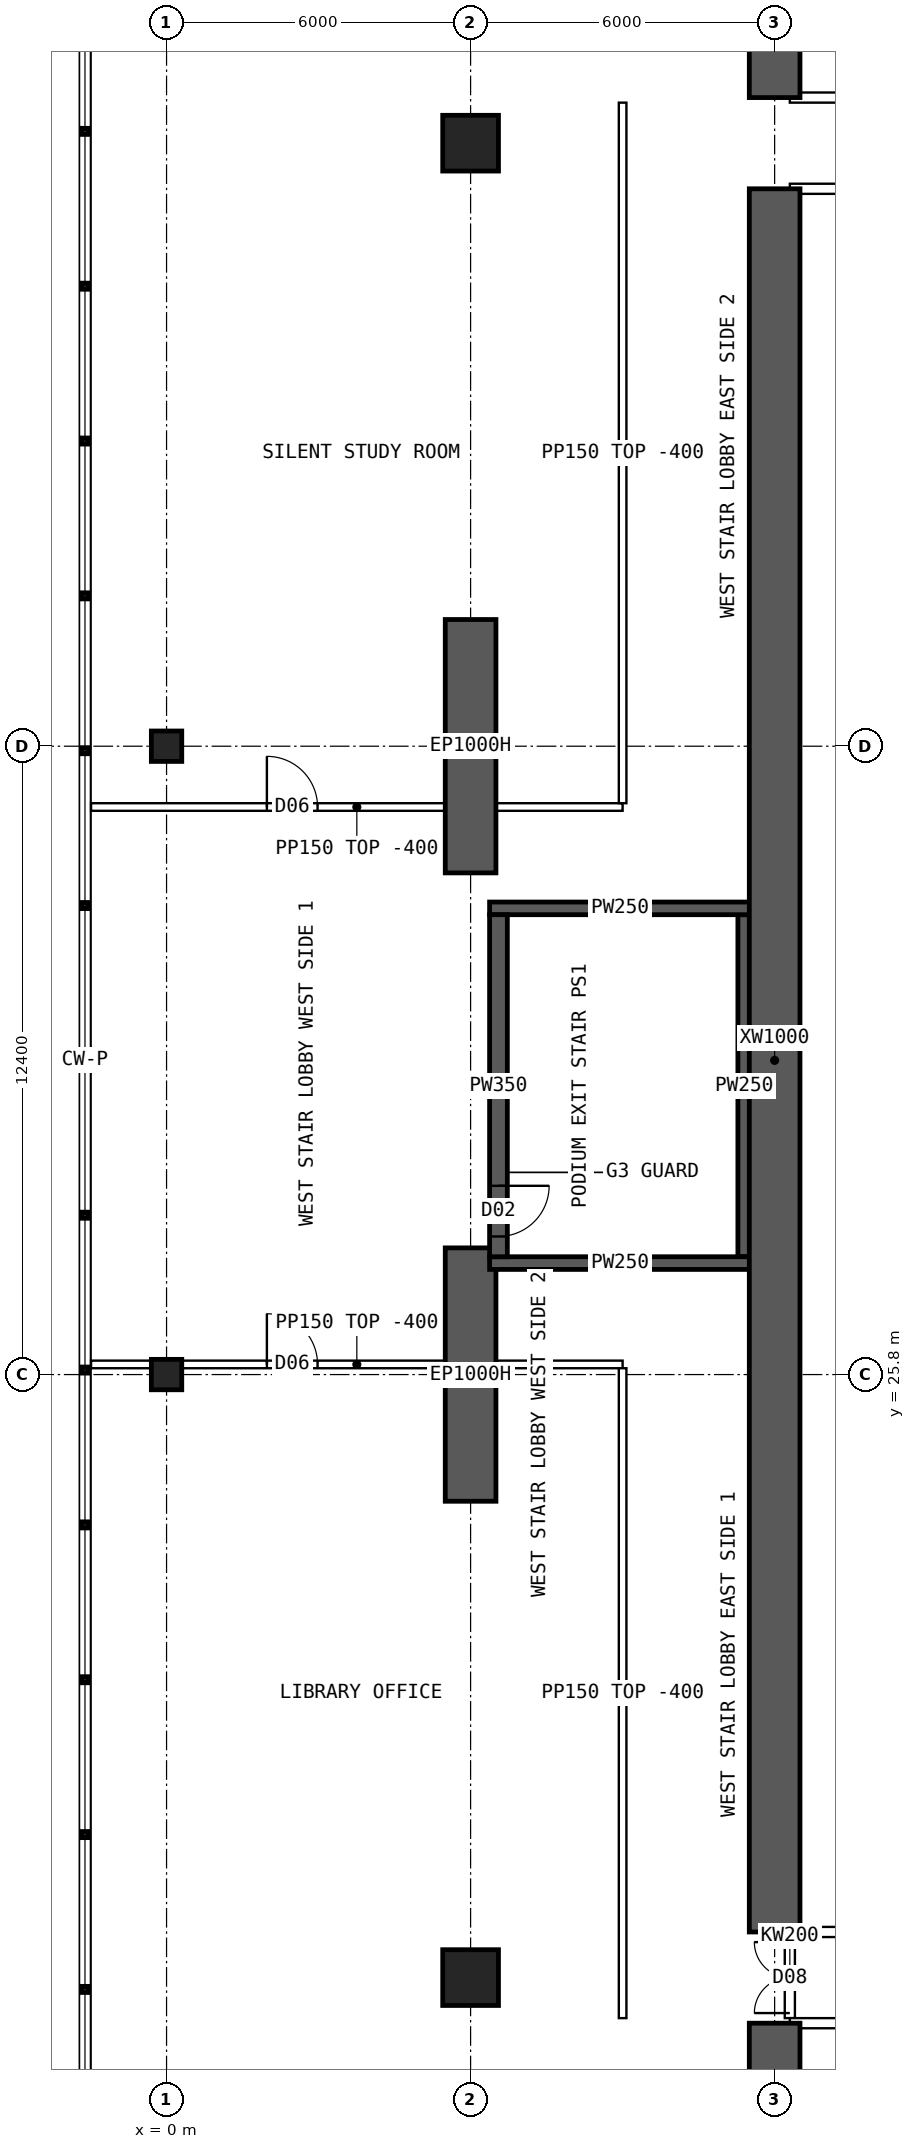
"""IFC4 building model, lengths in metres.
Left out: names, types, materials, properties, quantities, classifications, styles, units other than length and angle.
Written with IfcOpenShell. Run it as: python <this file> out.ifc"""

import sys

from ifc_helpers import new_model, si_unit, direction, frame, frame_2d, origin, origin_2d, place, context, subcontext, project, spatial, polyline, rectangle, hollow_rectangle, outline, extrude, element, fill, save


model = new_model("IFC4")
c1 = context("Model", 3, precision=1e-05, world=origin(), true_north=direction((0.0, 1.0)))
c2 = subcontext(c1, "Body", "Model", "MODEL_VIEW")
j1 = project(units=[si_unit("LENGTHUNIT", "METRE"), si_unit("PLANEANGLEUNIT", "RADIAN")], contexts=[c1])
p1 = place(None, origin())
s1 = spatial("IfcSite", under=j1, at=p1, CompositionType="ELEMENT")
p2 = place(p1, origin())
s2 = spatial("IfcBuilding", under=s1, at=p2, CompositionType="ELEMENT")
p3 = place(p2, frame((0.0, 0.0, 11.0)))
s3 = spatial("IfcBuildingStorey", under=s2, at=p3, CompositionType="ELEMENT", Elevation=11.0)
for number, where, z_axis, x_axis in (
    (1, (6.0, 23.3, 0.0), (0.0, 0.0, 1.0), (0.0, 1.0, 0.0)),
    (2, (6.0, 35.7, 0.0), (0.0, 0.0, 1.0), (0.0, 1.0, 0.0)),
):
    element("IfcWall", number, at=place(p3, frame(where, z_axis=z_axis, x_axis=x_axis)), inside=s3, PredefinedType="SHEAR", context=c2, shape_type="SweptSolid", body=[
        extrude(rectangle(XDim=5.0, YDim=1.0, at=frame_2d((2.5, 0.0))), origin(), (0.0, 0.0, 1.0), 5.0),
    ])
for number, where, z_axis, x_axis in (
    (3, (6.0, 13.9, 0.0), (0.0, 0.0, 1.0), (1.0, 0.0, 0.0)),
    (4, (6.0, 50.1, 0.0), (0.0, 0.0, 1.0), (1.0, 0.0, 0.0)),
):
    element("IfcColumn", number, at=place(p3, frame(where, z_axis=z_axis, x_axis=x_axis)), inside=s3, PredefinedType="COLUMN", context=c2, shape_type="SweptSolid", body=[
        extrude(hollow_rectangle(XDim=1.1, YDim=1.1, WallThickness=0.11, at=origin_2d()), origin(), (0.0, 0.0, 1.0), 5.0),
    ])
for number, where, z_axis, x_axis in (
    (5, (0.0, 25.8, 0.0), (0.0, 0.0, 1.0), (1.0, 0.0, 0.0)),
    (6, (0.0, 38.2, 0.0), (0.0, 0.0, 1.0), (1.0, 0.0, 0.0)),
):
    element("IfcColumn", number, at=place(p3, frame(where, z_axis=z_axis, x_axis=x_axis)), inside=s3, PredefinedType="COLUMN", context=c2, shape_type="SweptSolid", body=[
        extrude(hollow_rectangle(XDim=0.6, YDim=0.6, WallThickness=0.06, at=origin_2d()), origin(), (0.0, 0.0, 1.0), 5.0),
    ])
p4 = place(p3, frame((6.375, 28.0, 0.0), z_axis=(0.0, 0.0, 1.0), x_axis=(1.0, 0.0, 0.0)))
e7 = element("IfcWall", 7, at=p4, inside=s3, PredefinedType="SHEAR", context=c2, shape_type="SweptSolid", body=[
    extrude(rectangle(XDim=5.15, YDim=0.25, at=frame_2d((2.575, 0.0))), origin(), (0.0, 0.0, 1.0), 5.0),
])
p5 = place(p3, frame((11.4, 28.125, 0.0), z_axis=(0.0, 0.0, 1.0), x_axis=(0.0, 1.0, 0.0)))
e8 = element("IfcWall", 8, at=p5, inside=s3, PredefinedType="SHEAR", context=c2, shape_type="SweptSolid", body=[
    extrude(rectangle(XDim=6.75, YDim=0.25, at=frame_2d((3.375, 0.0))), origin(), (0.0, 0.0, 1.0), 5.0),
])
p6 = place(p3, frame((11.525, 35.0, 0.0), z_axis=(0.0, 0.0, 1.0), x_axis=(-1.0, 0.0, 0.0)))
e9 = element("IfcWall", 9, at=p6, inside=s3, PredefinedType="SHEAR", context=c2, shape_type="SweptSolid", body=[
    extrude(rectangle(XDim=5.15, YDim=0.25, at=frame_2d((2.575, 0.0))), origin(), (0.0, 0.0, 1.0), 5.0),
])
p7 = place(p3, frame((6.55, 34.875, 0.0), z_axis=(0.0, 0.0, 1.0), x_axis=(0.0, -1.0, 0.0)))
e10 = element("IfcWall", 10, at=p7, inside=s3, PredefinedType="SHEAR", context=c2, shape_type="SweptSolid", body=[
    extrude(rectangle(XDim=6.75, YDim=0.35, at=frame_2d((3.375, 0.0))), origin(), (0.0, 0.0, 1.0), 5.0),
])
p8 = place(p7, frame((5.35, 0.0, 0.0)))
e11 = element("IfcOpeningElement", 11, at=p8, cuts=e10, PredefinedType="OPENING", context=c2, shape_type="SweptSolid", body=[
    extrude(rectangle(XDim=1.0, YDim=2.1, at=frame_2d((0.5, 1.05))), frame((0.0, 0.185, 0.0), z_axis=(0.0, -1.0, 0.0), x_axis=(1.0, 0.0, 0.0)), (0.0, 0.0, 1.0), 0.37),
])
for number, where, z_axis, x_axis in (
    (12, (12.0, 7.7, 0.0), (0.0, 0.0, 1.0), (0.0, 1.0, 0.0)),
    (13, (12.0, 51.0, 0.0), (0.0, 0.0, 1.0), (0.0, 1.0, 0.0)),
):
    element("IfcWall", number, at=place(p3, frame(where, z_axis=z_axis, x_axis=x_axis)), inside=s3, PredefinedType="SHEAR", context=c2, shape_type="SweptSolid", body=[
        extrude(rectangle(XDim=5.3, YDim=1.0, at=frame_2d((2.65, 0.0))), origin(), (0.0, 0.0, 1.0), 5.0),
    ])
p9 = place(p3, frame((12.0, 14.8, 0.0), z_axis=(0.0, 0.0, 1.0), x_axis=(0.0, 1.0, 0.0)))
e14 = element("IfcWall", 14, at=p9, inside=s3, PredefinedType="SHEAR", context=c2, shape_type="SweptSolid", body=[
    extrude(rectangle(XDim=34.4, YDim=1.0, at=frame_2d((17.2, 0.0))), origin(), (0.0, 0.0, 1.0), 5.0),
])
for number, where, z_axis, x_axis in (
    (15, (12.3, 13.0, 0.0), (0.0, 0.0, 1.0), (1.0, 0.0, 0.0)),
    (16, (12.3, 51.0, 0.0), (0.0, 0.0, 1.0), (1.0, 0.0, 0.0)),
):
    element("IfcWall", number, at=place(p3, frame(where, z_axis=z_axis, x_axis=x_axis)), inside=s3, PredefinedType="SOLIDWALL", context=c2, shape_type="SweptSolid", body=[
        extrude(rectangle(XDim=5.2, YDim=0.2, at=frame_2d((2.6, 0.0))), origin(), (0.0, 0.0, 1.0), 4.6),
    ])
for number, where, z_axis, x_axis in (
    (17, (12.3, 14.8, 0.0), (0.0, 0.0, 1.0), (1.0, 0.0, 0.0)),
    (18, (12.3, 49.2, 0.0), (0.0, 0.0, 1.0), (1.0, 0.0, 0.0)),
):
    element("IfcWall", number, at=place(p3, frame(where, z_axis=z_axis, x_axis=x_axis)), inside=s3, PredefinedType="SOLIDWALL", context=c2, shape_type="SweptSolid", body=[
        extrude(rectangle(XDim=3.3, YDim=0.2, at=frame_2d((1.65, 0.0))), origin(), (0.0, 0.0, 1.0), 4.6),
    ])
p10 = place(p3, frame((-1.49, 26.0, 0.0), z_axis=(0.0, 0.0, 1.0), x_axis=(1.0, 0.0, 0.0)))
e19 = element("IfcWall", 19, at=p10, inside=s3, PredefinedType="PARTITIONING", context=c2, shape_type="SweptSolid", body=[
    extrude(outline(polyline([(0.0, 0.0), (10.49, 0.0), (10.49, 4.6), (1.792, 4.6), (1.79, 4.0), (1.192, 4.0), (1.19, 4.6), (0.0, 4.6), (0.0, 0.0)])), frame((0.0, 0.075, 0.0), z_axis=(0.0, -1.0, 0.0), x_axis=(1.0, 0.0, 0.0)), (0.0, 0.0, 1.0), 0.15),
])
p11 = place(p10, frame((3.47, 0.0, 0.0)))
e20 = element("IfcOpeningElement", 20, at=p11, cuts=e19, PredefinedType="OPENING", context=c2, shape_type="SweptSolid", body=[
    extrude(rectangle(XDim=1.0, YDim=2.1, at=frame_2d((0.5, 1.05))), frame((0.0, 0.085, 0.0), z_axis=(0.0, -1.0, 0.0), x_axis=(1.0, 0.0, 0.0)), (0.0, 0.0, 1.0), 0.17),
])
p12 = place(p3, frame((-1.49, 37.0, 0.0), z_axis=(0.0, 0.0, 1.0), x_axis=(1.0, 0.0, 0.0)))
e21 = element("IfcWall", 21, at=p12, inside=s3, PredefinedType="PARTITIONING", context=c2, shape_type="SweptSolid", body=[
    extrude(outline(polyline([(0.0, 0.0), (10.49, 0.0), (10.49, 4.6), (1.792, 4.6), (1.79, 4.0), (1.192, 4.0), (1.19, 4.6), (0.0, 4.6), (0.0, 0.0)])), frame((0.0, 0.075, 0.0), z_axis=(0.0, -1.0, 0.0), x_axis=(1.0, 0.0, 0.0)), (0.0, 0.0, 1.0), 0.15),
])
p13 = place(p12, frame((3.47, 0.0, 0.0)))
e22 = element("IfcOpeningElement", 22, at=p13, cuts=e21, PredefinedType="OPENING", context=c2, shape_type="SweptSolid", body=[
    extrude(rectangle(XDim=1.0, YDim=2.1, at=frame_2d((0.5, 1.05))), frame((0.0, 0.085, 0.0), z_axis=(0.0, -1.0, 0.0), x_axis=(1.0, 0.0, 0.0)), (0.0, 0.0, 1.0), 0.17),
])
p14 = place(p3, frame((9.0, 13.1, 0.0), z_axis=(0.0, 0.0, 1.0), x_axis=(0.0, 1.0, 0.0)))
e23 = element("IfcWall", 23, at=p14, inside=s3, PredefinedType="PARTITIONING", context=c2, shape_type="SweptSolid", body=[
    extrude(rectangle(XDim=12.825, YDim=0.15, at=frame_2d((6.413, 0.0))), origin(), (0.0, 0.0, 1.0), 4.6),
])
p15 = place(p3, frame((9.0, 37.075, 0.0), z_axis=(0.0, 0.0, 1.0), x_axis=(0.0, 1.0, 0.0)))
e24 = element("IfcWall", 24, at=p15, inside=s3, PredefinedType="PARTITIONING", context=c2, shape_type="SweptSolid", body=[
    extrude(rectangle(XDim=13.825, YDim=0.15, at=frame_2d((6.913, 0.0))), origin(), (0.0, 0.0, 1.0), 4.6),
])
p16 = place(p3, frame((12.3, 13.1, 0.0), z_axis=(0.0, 0.0, 1.0), x_axis=(0.0, 1.0, 0.0)))
e25 = element("IfcWall", 25, at=p16, inside=s3, PredefinedType="SOLIDWALL", context=c2, shape_type="SweptSolid", body=[
    extrude(rectangle(XDim=1.6, YDim=0.2, at=frame_2d((0.8, 0.0))), origin(), (0.0, 0.0, 1.0), 4.6),
])
p17 = place(p16, frame((0.1, 0.0, 0.0)))
e26 = element("IfcOpeningElement", 26, at=p17, cuts=e25, PredefinedType="OPENING", context=c2, shape_type="SweptSolid", body=[
    extrude(rectangle(XDim=1.4, YDim=2.1, at=frame_2d((0.7, 1.05))), frame((0.0, 0.11, 0.0), z_axis=(0.0, -1.0, 0.0), x_axis=(1.0, 0.0, 0.0)), (0.0, 0.0, 1.0), 0.22),
])
p18 = place(p8, origin())
e27 = element("IfcDoor", 27, at=p18, inside=s3, OperationType="SINGLE_SWING_LEFT", PredefinedType="DOOR", context=c2, shape_type="SweptSolid", body=[
    extrude(rectangle(XDim=1.0, YDim=2.1, at=frame_2d((0.5, 1.05))), frame((0.0, 0.025, 0.0), z_axis=(0.0, -1.0, 0.0), x_axis=(1.0, 0.0, 0.0)), (0.0, 0.0, 1.0), 0.05),
])
fill(e11, e27)
p19 = place(p11, origin())
e28 = element("IfcDoor", 28, at=p19, inside=s3, OperationType="SINGLE_SWING_LEFT", PredefinedType="DOOR", context=c2, shape_type="SweptSolid", body=[
    extrude(rectangle(XDim=1.0, YDim=2.1, at=frame_2d((0.5, 1.05))), frame((0.0, 0.025, 0.0), z_axis=(0.0, -1.0, 0.0), x_axis=(1.0, 0.0, 0.0)), (0.0, 0.0, 1.0), 0.05),
])
fill(e20, e28)
p20 = place(p13, origin())
e29 = element("IfcDoor", 29, at=p20, inside=s3, OperationType="SINGLE_SWING_LEFT", PredefinedType="DOOR", context=c2, shape_type="SweptSolid", body=[
    extrude(rectangle(XDim=1.0, YDim=2.1, at=frame_2d((0.5, 1.05))), frame((0.0, 0.025, 0.0), z_axis=(0.0, -1.0, 0.0), x_axis=(1.0, 0.0, 0.0)), (0.0, 0.0, 1.0), 0.05),
])
fill(e22, e29)
p21 = place(p17, origin())
e30 = element("IfcDoor", 30, at=p21, inside=s3, OperationType="DOUBLE_DOOR_SINGLE_SWING", PredefinedType="DOOR", context=c2, shape_type="SweptSolid", body=[
    extrude(rectangle(XDim=1.4, YDim=2.1, at=frame_2d((0.7, 1.05))), frame((0.0, 0.025, 0.0), z_axis=(0.0, -1.0, 0.0), x_axis=(1.0, 0.0, 0.0)), (0.0, 0.0, 1.0), 0.05),
])
fill(e26, e30)
save(model, sys.argv[1])
